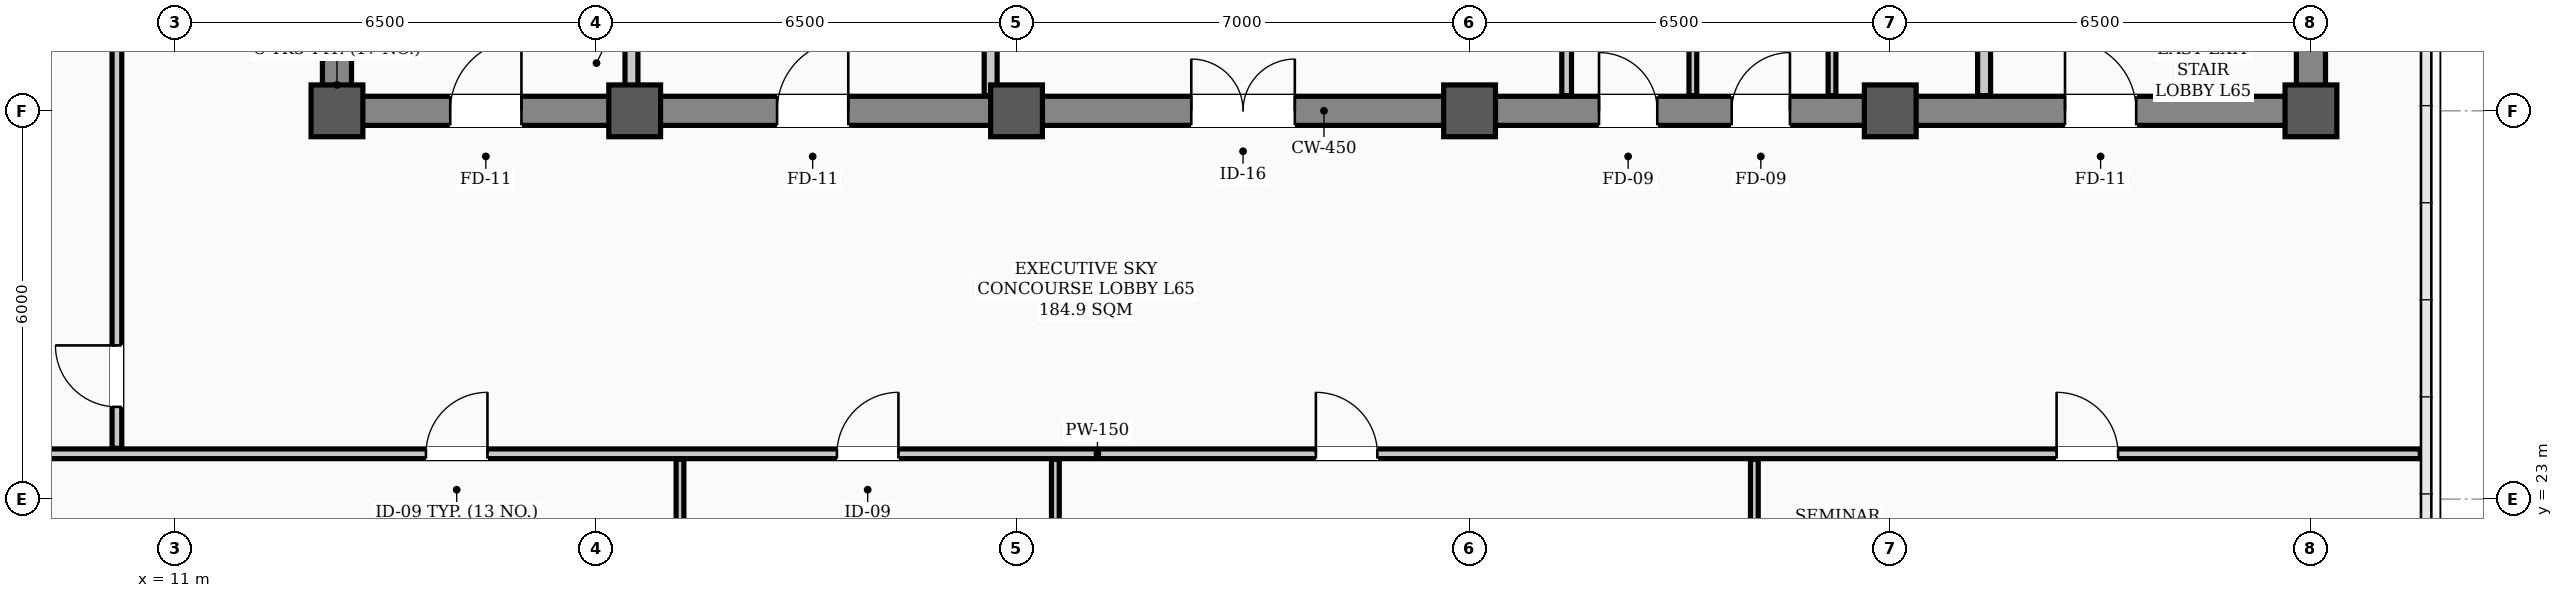
"""IFC4 building model, lengths in metres.
Left out: names, types, materials, properties, quantities, classifications, styles, units other than length and angle.
Written with IfcOpenShell. Run it as: python <this file> out.ifc"""

import sys

from ifc_helpers import new_model, si_unit, direction, frame, frame_2d, origin, origin_2d, place, context, subcontext, project, spatial, rectangle, hollow_rectangle, extrude, element, fill, save


model = new_model("IFC4")
c1 = context("Model", 3, precision=1e-05, world=origin(), true_north=direction((0.0, 1.0)))
c2 = subcontext(c1, "Body", "Model", "MODEL_VIEW")
j1 = project(units=[si_unit("LENGTHUNIT", "METRE"), si_unit("PLANEANGLEUNIT", "RADIAN")], contexts=[c1])
p1 = place(None, origin())
s1 = spatial("IfcSite", under=j1, at=p1, CompositionType="ELEMENT")
p2 = place(p1, origin())
s2 = spatial("IfcBuilding", under=s1, at=p2, CompositionType="ELEMENT")
p3 = place(p2, frame((0.0, 0.0, 261.8)))
s3 = spatial("IfcBuildingStorey", under=s2, at=p3, CompositionType="ELEMENT", Elevation=261.8)
for number, where, z_axis, x_axis in (
    (1, (13.5, 29.0, 0.0), (0.0, 0.0, 1.0), (1.0, 0.0, 0.0)),
    (2, (18.1, 29.0, 0.0), (0.0, 0.0, 1.0), (1.0, 0.0, 0.0)),
    (3, (24.0, 29.0, 0.0), (0.0, 0.0, 1.0), (1.0, 0.0, 0.0)),
    (4, (31.0, 29.0, 0.0), (0.0, 0.0, 1.0), (1.0, 0.0, 0.0)),
    (5, (37.5, 29.0, 0.0), (0.0, 0.0, 1.0), (1.0, 0.0, 0.0)),
    (6, (44.0, 29.0, 0.0), (0.0, 0.0, 1.0), (1.0, 0.0, 0.0)),
):
    element("IfcColumn", number, at=place(p3, frame(where, z_axis=z_axis, x_axis=x_axis)), inside=s3, PredefinedType="COLUMN", context=c2, shape_type="SweptSolid", body=[
        extrude(hollow_rectangle(XDim=0.8, YDim=0.8, WallThickness=0.032, InnerFilletRadius=0.016, OuterFilletRadius=0.048, at=origin_2d()), origin(), (0.0, 0.0, 1.0), 3.9),
    ])
p4 = place(p3, frame((13.5, 29.0, 0.0), z_axis=(0.0, 0.0, 1.0), x_axis=(1.0, 0.0, 0.0)))
e7 = element("IfcWall", 7, at=p4, inside=s3, PredefinedType="SHEAR", context=c2, shape_type="SweptSolid", body=[
    extrude(rectangle(XDim=30.5, YDim=0.45, at=frame_2d((15.25, 0.0))), origin(), (0.0, 0.0, 1.0), 3.72),
])
p5 = place(p4, frame((1.75, 0.0, 0.0)))
e8 = element("IfcOpeningElement", 8, at=p5, cuts=e7, PredefinedType="OPENING", context=c2, shape_type="SweptSolid", body=[
    extrude(rectangle(XDim=1.1, YDim=2.08, at=frame_2d((0.55, 1.04))), frame((0.0, 0.235, 0.0), z_axis=(0.0, -1.0, 0.0), x_axis=(1.0, 0.0, 0.0)), (0.0, 0.0, 1.0), 0.47),
])
p6 = place(p4, frame((26.7, 0.0, 0.0)))
e9 = element("IfcOpeningElement", 9, at=p6, cuts=e7, PredefinedType="OPENING", context=c2, shape_type="SweptSolid", body=[
    extrude(rectangle(XDim=1.1, YDim=2.08, at=frame_2d((0.55, 1.04))), frame((0.0, 0.235, 0.0), z_axis=(0.0, -1.0, 0.0), x_axis=(1.0, 0.0, 0.0)), (0.0, 0.0, 1.0), 0.47),
])
p7 = place(p4, frame((6.8, 0.0, 0.0)))
e10 = element("IfcOpeningElement", 10, at=p7, cuts=e7, PredefinedType="OPENING", context=c2, shape_type="SweptSolid", body=[
    extrude(rectangle(XDim=1.1, YDim=2.08, at=frame_2d((0.55, 1.04))), frame((0.0, 0.235, 0.0), z_axis=(0.0, -1.0, 0.0), x_axis=(1.0, 0.0, 0.0)), (0.0, 0.0, 1.0), 0.47),
])
p8 = place(p4, frame((13.2, 0.0, 0.0)))
e11 = element("IfcOpeningElement", 11, at=p8, cuts=e7, PredefinedType="OPENING", context=c2, shape_type="SweptSolid", body=[
    extrude(rectangle(XDim=1.6, YDim=2.08, at=frame_2d((0.8, 1.04))), frame((0.0, 0.235, 0.0), z_axis=(0.0, -1.0, 0.0), x_axis=(1.0, 0.0, 0.0)), (0.0, 0.0, 1.0), 0.47),
])
p9 = place(p4, frame((19.5, 0.0, 0.0)))
e12 = element("IfcOpeningElement", 12, at=p9, cuts=e7, PredefinedType="OPENING", context=c2, shape_type="SweptSolid", body=[
    extrude(rectangle(XDim=0.9, YDim=2.08, at=frame_2d((0.45, 1.04))), frame((0.0, 0.235, 0.0), z_axis=(0.0, -1.0, 0.0), x_axis=(1.0, 0.0, 0.0)), (0.0, 0.0, 1.0), 0.47),
])
p10 = place(p4, frame((21.55, 0.0, 0.0)))
e13 = element("IfcOpeningElement", 13, at=p10, cuts=e7, PredefinedType="OPENING", context=c2, shape_type="SweptSolid", body=[
    extrude(rectangle(XDim=0.9, YDim=2.08, at=frame_2d((0.45, 1.04))), frame((0.0, 0.235, 0.0), z_axis=(0.0, -1.0, 0.0), x_axis=(1.0, 0.0, 0.0)), (0.0, 0.0, 1.0), 0.47),
])
for number, where, z_axis, x_axis in (
    (14, (13.5, 29.35, 0.0), (0.0, 0.0, 1.0), (0.0, 1.0, 0.0)),
    (15, (44.0, 29.35, 0.0), (0.0, 0.0, 1.0), (0.0, 1.0, 0.0)),
):
    element("IfcWall", number, at=place(p3, frame(where, z_axis=z_axis, x_axis=x_axis)), inside=s3, PredefinedType="SHEAR", context=c2, shape_type="SweptSolid", body=[
        extrude(rectangle(XDim=8.6, YDim=0.45, at=frame_2d((4.3, 0.0))), origin(), (0.0, 0.0, 1.0), 3.72),
    ])
p11 = place(p3, frame((4.81, 23.7, 0.0), z_axis=(0.0, 0.0, 1.0), x_axis=(1.0, 0.0, 0.0)))
e16 = element("IfcWall", 16, at=p11, inside=s3, PredefinedType="PARTITIONING", context=c2, shape_type="SweptSolid", body=[
    extrude(rectangle(XDim=40.88, YDim=0.15, at=frame_2d((20.44, 0.0))), origin(), (0.0, 0.0, 1.0), 3.2),
])
p12 = place(p11, frame((10.065, 0.0, 0.0)))
e17 = element("IfcOpeningElement", 17, at=p12, cuts=e16, PredefinedType="OPENING", context=c2, shape_type="SweptSolid", body=[
    extrude(rectangle(XDim=0.95, YDim=2.08, at=frame_2d((0.475, 1.04))), frame((0.0, 0.085, 0.0), z_axis=(0.0, -1.0, 0.0), x_axis=(1.0, 0.0, 0.0)), (0.0, 0.0, 1.0), 0.17),
])
p13 = place(p11, frame((16.415, 0.0, 0.0)))
e18 = element("IfcOpeningElement", 18, at=p13, cuts=e16, PredefinedType="OPENING", context=c2, shape_type="SweptSolid", body=[
    extrude(rectangle(XDim=0.95, YDim=2.08, at=frame_2d((0.475, 1.04))), frame((0.0, 0.085, 0.0), z_axis=(0.0, -1.0, 0.0), x_axis=(1.0, 0.0, 0.0)), (0.0, 0.0, 1.0), 0.17),
])
p14 = place(p11, frame((23.815, 0.0, 0.0)))
e19 = element("IfcOpeningElement", 19, at=p14, cuts=e16, PredefinedType="OPENING", context=c2, shape_type="SweptSolid", body=[
    extrude(rectangle(XDim=0.95, YDim=2.08, at=frame_2d((0.475, 1.04))), frame((0.0, 0.085, 0.0), z_axis=(0.0, -1.0, 0.0), x_axis=(1.0, 0.0, 0.0)), (0.0, 0.0, 1.0), 0.17),
])
p15 = place(p11, frame((35.26, 0.0, 0.0)))
e20 = element("IfcOpeningElement", 20, at=p15, cuts=e16, PredefinedType="OPENING", context=c2, shape_type="SweptSolid", body=[
    extrude(rectangle(XDim=0.95, YDim=2.08, at=frame_2d((0.475, 1.04))), frame((0.0, 0.085, 0.0), z_axis=(0.0, -1.0, 0.0), x_axis=(1.0, 0.0, 0.0)), (0.0, 0.0, 1.0), 0.17),
])
p16 = place(p3, frame((18.05, 29.235, 0.0), z_axis=(0.0, 0.0, 1.0), x_axis=(0.0, 1.0, 0.0)))
e21 = element("IfcWall", 21, at=p16, inside=s3, PredefinedType="STANDARD", context=c2, shape_type="SweptSolid", body=[
    extrude(rectangle(XDim=1.065, YDim=0.2, at=frame_2d((0.532, 0.0))), origin(), (0.0, 0.0, 1.0), 3.4),
])
p17 = place(p3, frame((38.95, 29.235, 0.0), z_axis=(0.0, 0.0, 1.0), x_axis=(0.0, 1.0, 0.0)))
e22 = element("IfcWall", 22, at=p17, inside=s3, PredefinedType="STANDARD", context=c2, shape_type="SweptSolid", body=[
    extrude(rectangle(XDim=1.065, YDim=0.2, at=frame_2d((0.532, 0.0))), origin(), (0.0, 0.0, 1.0), 3.72),
])
p18 = place(p3, frame((23.6, 29.235, 0.0), z_axis=(0.0, 0.0, 1.0), x_axis=(0.0, 1.0, 0.0)))
e23 = element("IfcWall", 23, at=p18, inside=s3, PredefinedType="STANDARD", context=c2, shape_type="SweptSolid", body=[
    extrude(rectangle(XDim=5.465, YDim=0.2, at=frame_2d((2.732, 0.0))), origin(), (0.0, 0.0, 1.0), 3.2),
])
p19 = place(p3, frame((32.5, 29.235, 0.0), z_axis=(0.0, 0.0, 1.0), x_axis=(0.0, 1.0, 0.0)))
e24 = element("IfcWall", 24, at=p19, inside=s3, PredefinedType="PARTITIONING", context=c2, shape_type="SweptSolid", body=[
    extrude(rectangle(XDim=2.53, YDim=0.15, at=frame_2d((1.265, 0.0))), origin(), (0.0, 0.0, 1.0), 3.4),
])
for number, where, z_axis, x_axis in (
    (25, (36.6, 29.235, 0.0), (0.0, 0.0, 1.0), (0.0, 1.0, 0.0)),
    (26, (34.45, 29.235, 0.0), (0.0, 0.0, 1.0), (0.0, 1.0, 0.0)),
):
    element("IfcWall", number, at=place(p3, frame(where, z_axis=z_axis, x_axis=x_axis)), inside=s3, PredefinedType="PARTITIONING", context=c2, shape_type="SweptSolid", body=[
        extrude(rectangle(XDim=2.53, YDim=0.12, at=frame_2d((1.265, 0.0))), origin(), (0.0, 0.0, 1.0), 3.4),
    ])
p20 = place(p3, frame((10.1, 23.785, 0.0), z_axis=(0.0, 0.0, 1.0), x_axis=(0.0, 1.0, 0.0)))
e27 = element("IfcWall", 27, at=p20, inside=s3, PredefinedType="PARTITIONING", context=c2, shape_type="SweptSolid", body=[
    extrude(rectangle(XDim=17.88, YDim=0.15, at=frame_2d((8.94, 0.0))), origin(), (0.0, 0.0, 1.0), 3.1),
])
p21 = place(p20, frame((0.64, 0.0, 0.0)))
e28 = element("IfcOpeningElement", 28, at=p21, cuts=e27, PredefinedType="OPENING", context=c2, shape_type="SweptSolid", body=[
    extrude(rectangle(XDim=0.95, YDim=2.08, at=frame_2d((0.475, 1.04))), frame((0.0, 0.085, 0.0), z_axis=(0.0, -1.0, 0.0), x_axis=(1.0, 0.0, 0.0)), (0.0, 0.0, 1.0), 0.17),
])
p22 = place(p20, frame((13.015, 0.0, 0.0)))
e29 = element("IfcOpeningElement", 29, at=p22, cuts=e27, PredefinedType="OPENING", context=c2, shape_type="SweptSolid", body=[
    extrude(rectangle(XDim=0.95, YDim=2.08, at=frame_2d((0.475, 1.04))), frame((0.0, 0.085, 0.0), z_axis=(0.0, -1.0, 0.0), x_axis=(1.0, 0.0, 0.0)), (0.0, 0.0, 1.0), 0.17),
])
p23 = place(p3, frame((18.8, 17.91, 0.0), z_axis=(0.0, 0.0, 1.0), x_axis=(0.0, 1.0, 0.0)))
e30 = element("IfcWall", 30, at=p23, inside=s3, PredefinedType="PARTITIONING", context=c2, shape_type="SweptSolid", body=[
    extrude(rectangle(XDim=5.705, YDim=0.12, at=frame_2d((2.853, 0.0))), origin(), (0.0, 0.0, 1.0), 3.1),
])
p24 = place(p3, frame((24.6, 19.67, 0.0), z_axis=(0.0, 0.0, 1.0), x_axis=(0.0, 1.0, 0.0)))
e31 = element("IfcWall", 31, at=p24, inside=s3, PredefinedType="PARTITIONING", context=c2, shape_type="SweptSolid", body=[
    extrude(rectangle(XDim=3.945, YDim=0.12, at=frame_2d((1.973, 0.0))), origin(), (0.0, 0.0, 1.0), 3.1),
])
p25 = place(p3, frame((35.4, 17.91, 0.0), z_axis=(0.0, 0.0, 1.0), x_axis=(0.0, 1.0, 0.0)))
e32 = element("IfcWall", 32, at=p25, inside=s3, PredefinedType="PARTITIONING", context=c2, shape_type="SweptSolid", body=[
    extrude(rectangle(XDim=5.705, YDim=0.12, at=frame_2d((2.853, 0.0))), origin(), (0.0, 0.0, 1.0), 3.1),
])
p26 = place(p5, origin())
e33 = element("IfcDoor", 33, at=p26, inside=s3, OperationType="SINGLE_SWING_RIGHT", PredefinedType="DOOR", context=c2, shape_type="SweptSolid", body=[
    extrude(rectangle(XDim=1.1, YDim=2.08, at=frame_2d((0.55, 1.04))), frame((0.0, 0.025, 0.0), z_axis=(0.0, -1.0, 0.0), x_axis=(1.0, 0.0, 0.0)), (0.0, 0.0, 1.0), 0.05),
])
fill(e8, e33)
p27 = place(p6, origin())
e34 = element("IfcDoor", 34, at=p27, inside=s3, OperationType="SINGLE_SWING_LEFT", PredefinedType="DOOR", context=c2, shape_type="SweptSolid", body=[
    extrude(rectangle(XDim=1.1, YDim=2.08, at=frame_2d((0.55, 1.04))), frame((0.0, 0.025, 0.0), z_axis=(0.0, -1.0, 0.0), x_axis=(1.0, 0.0, 0.0)), (0.0, 0.0, 1.0), 0.05),
])
fill(e9, e34)
p28 = place(p7, origin())
e35 = element("IfcDoor", 35, at=p28, inside=s3, OperationType="SINGLE_SWING_RIGHT", PredefinedType="DOOR", context=c2, shape_type="SweptSolid", body=[
    extrude(rectangle(XDim=1.1, YDim=2.08, at=frame_2d((0.55, 1.04))), frame((0.0, 0.025, 0.0), z_axis=(0.0, -1.0, 0.0), x_axis=(1.0, 0.0, 0.0)), (0.0, 0.0, 1.0), 0.05),
])
fill(e10, e35)
p29 = place(p8, origin())
e36 = element("IfcDoor", 36, at=p29, inside=s3, OperationType="DOUBLE_DOOR_SINGLE_SWING", PredefinedType="DOOR", context=c2, shape_type="SweptSolid", body=[
    extrude(rectangle(XDim=1.6, YDim=2.08, at=frame_2d((0.8, 1.04))), frame((0.0, 0.025, 0.0), z_axis=(0.0, -1.0, 0.0), x_axis=(1.0, 0.0, 0.0)), (0.0, 0.0, 1.0), 0.05),
])
fill(e11, e36)
p30 = place(p9, origin())
e37 = element("IfcDoor", 37, at=p30, inside=s3, OperationType="SINGLE_SWING_LEFT", PredefinedType="DOOR", context=c2, shape_type="SweptSolid", body=[
    extrude(rectangle(XDim=0.9, YDim=2.08, at=frame_2d((0.45, 1.04))), frame((0.0, 0.025, 0.0), z_axis=(0.0, -1.0, 0.0), x_axis=(1.0, 0.0, 0.0)), (0.0, 0.0, 1.0), 0.05),
])
fill(e12, e37)
p31 = place(p10, origin())
e38 = element("IfcDoor", 38, at=p31, inside=s3, OperationType="SINGLE_SWING_RIGHT", PredefinedType="DOOR", context=c2, shape_type="SweptSolid", body=[
    extrude(rectangle(XDim=0.9, YDim=2.08, at=frame_2d((0.45, 1.04))), frame((0.0, 0.025, 0.0), z_axis=(0.0, -1.0, 0.0), x_axis=(1.0, 0.0, 0.0)), (0.0, 0.0, 1.0), 0.05),
])
fill(e13, e38)
p32 = place(p12, origin())
e39 = element("IfcDoor", 39, at=p32, inside=s3, OperationType="SINGLE_SWING_RIGHT", PredefinedType="DOOR", context=c2, shape_type="SweptSolid", body=[
    extrude(rectangle(XDim=0.95, YDim=2.08, at=frame_2d((0.475, 1.04))), frame((0.0, 0.025, 0.0), z_axis=(0.0, -1.0, 0.0), x_axis=(1.0, 0.0, 0.0)), (0.0, 0.0, 1.0), 0.05),
])
fill(e17, e39)
p33 = place(p13, origin())
e40 = element("IfcDoor", 40, at=p33, inside=s3, OperationType="SINGLE_SWING_RIGHT", PredefinedType="DOOR", context=c2, shape_type="SweptSolid", body=[
    extrude(rectangle(XDim=0.95, YDim=2.08, at=frame_2d((0.475, 1.04))), frame((0.0, 0.025, 0.0), z_axis=(0.0, -1.0, 0.0), x_axis=(1.0, 0.0, 0.0)), (0.0, 0.0, 1.0), 0.05),
])
fill(e18, e40)
p34 = place(p14, origin())
e41 = element("IfcDoor", 41, at=p34, inside=s3, OperationType="SINGLE_SWING_LEFT", PredefinedType="DOOR", context=c2, shape_type="SweptSolid", body=[
    extrude(rectangle(XDim=0.95, YDim=2.08, at=frame_2d((0.475, 1.04))), frame((0.0, 0.025, 0.0), z_axis=(0.0, -1.0, 0.0), x_axis=(1.0, 0.0, 0.0)), (0.0, 0.0, 1.0), 0.05),
])
fill(e19, e41)
p35 = place(p15, origin())
e42 = element("IfcDoor", 42, at=p35, inside=s3, OperationType="SINGLE_SWING_LEFT", PredefinedType="DOOR", context=c2, shape_type="SweptSolid", body=[
    extrude(rectangle(XDim=0.95, YDim=2.08, at=frame_2d((0.475, 1.04))), frame((0.0, 0.025, 0.0), z_axis=(0.0, -1.0, 0.0), x_axis=(1.0, 0.0, 0.0)), (0.0, 0.0, 1.0), 0.05),
])
fill(e20, e42)
p36 = place(p21, origin())
e43 = element("IfcDoor", 43, at=p36, inside=s3, OperationType="SINGLE_SWING_RIGHT", PredefinedType="DOOR", context=c2, shape_type="SweptSolid", body=[
    extrude(rectangle(XDim=0.95, YDim=2.08, at=frame_2d((0.475, 1.04))), frame((0.0, 0.025, 0.0), z_axis=(0.0, -1.0, 0.0), x_axis=(1.0, 0.0, 0.0)), (0.0, 0.0, 1.0), 0.05),
])
fill(e28, e43)
save(model, sys.argv[1])
